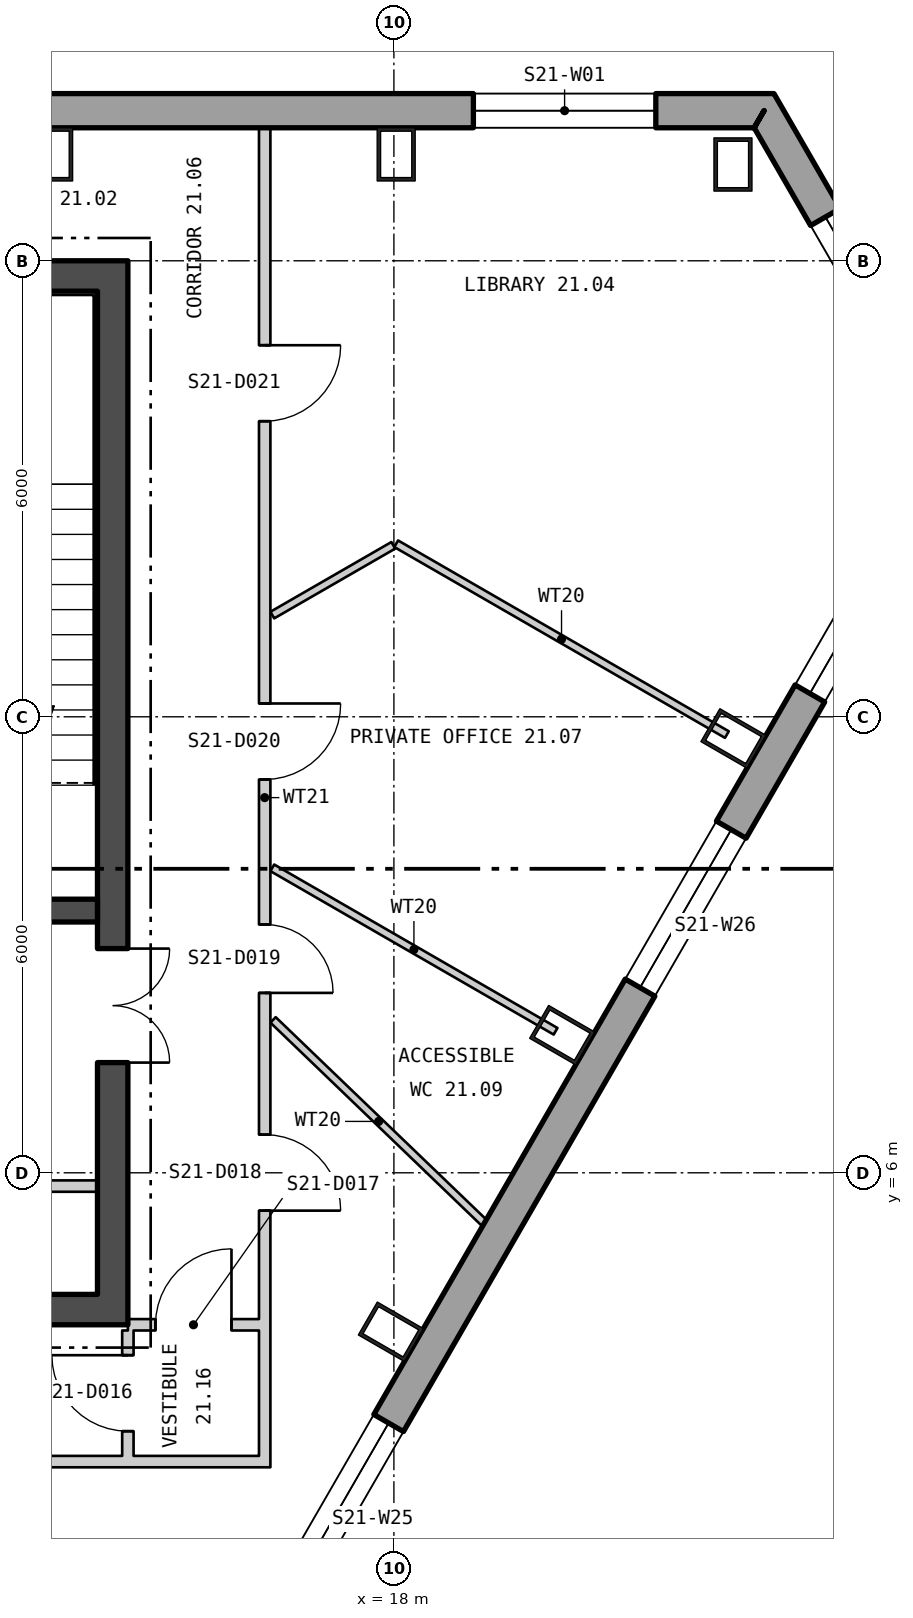
"""IFC4 building model, lengths in metres.
Left out: names, types, materials, properties, quantities, classifications, styles, units other than length and angle.
Written with IfcOpenShell. Run it as: python <this file> out.ifc"""

import sys

from ifc_helpers import new_model, si_unit, direction, frame, frame_2d, origin, origin_2d, place, context, subcontext, project, spatial, polyline, rectangle, hollow_rectangle, outline, extrude, element, fill, save


model = new_model("IFC4")
c1 = context("Model", 3, precision=1e-05, world=origin(), true_north=direction((0.0, 1.0)))
c2 = subcontext(c1, "Body", "Model", "MODEL_VIEW")
j1 = project(units=[si_unit("LENGTHUNIT", "METRE"), si_unit("PLANEANGLEUNIT", "RADIAN")], contexts=[c1])
p1 = place(None, origin())
s1 = spatial("IfcSite", under=j1, at=p1, CompositionType="ELEMENT")
p2 = place(p1, origin())
s2 = spatial("IfcBuilding", under=s1, at=p2, CompositionType="ELEMENT")
p3 = place(p2, frame((0.0, 0.0, 280.5)))
s3 = spatial("IfcBuildingStorey", under=s2, at=p3, CompositionType="ELEMENT", Elevation=280.5)
for number, where, z_axis, x_axis in (
    (1, (22.461, 19.267, 0.0), (0.0, 0.0, 1.0), (-1.0, 0.0, 0.0)),
    (2, (18.03, 19.4, 0.0), (0.0, 0.0, 1.0), (-1.0, 0.0, 0.0)),
    (3, (13.523, 19.4, 0.0), (0.0, 0.0, 1.0), (-1.0, 0.0, 0.0)),
    (4, (17.96, 3.908, 0.0), (0.0, 0.0, 1.0), (0.5, 0.866, 0.0)),
    (5, (20.214, 7.811, 0.0), (0.0, 0.0, 1.0), (0.5, 0.866, 0.0)),
    (6, (22.467, 11.715, 0.0), (0.0, 0.0, 1.0), (0.5, 0.866, 0.0)),
):
    element("IfcColumn", number, at=place(p3, frame(where, z_axis=z_axis, x_axis=x_axis)), inside=s3, PredefinedType="COLUMN", context=c2, shape_type="SweptSolid", body=[
        extrude(hollow_rectangle(XDim=0.5, YDim=0.7, WallThickness=0.045, at=origin_2d()), origin(), (0.0, 0.0, 1.0), 3.9),
    ])
p4 = place(p3, frame((22.87, 19.975, -0.4), z_axis=(0.0, 0.0, 1.0), x_axis=(-1.0, 0.0, 0.0)))
e7 = element("IfcWall", 7, at=p4, inside=s3, PredefinedType="SOLIDWALL", context=c2, shape_type="SweptSolid", body=[
    extrude(outline(polyline([(-0.13, -0.225), (45.87, -0.225), (45.61, 0.225), (0.13, 0.225), (-0.13, -0.225)])), origin(), (0.0, 0.0, 1.0), 3.9),
])
p5 = place(p4, frame((1.424, 0.0, 1.3)))
e8 = element("IfcOpeningElement", 8, at=p5, cuts=e7, PredefinedType="OPENING", context=c2, shape_type="SweptSolid", body=[
    extrude(rectangle(XDim=2.4, YDim=2.0, at=frame_2d((1.2, 1.0))), frame((0.0, 0.235, 0.0), z_axis=(0.0, -1.0, 0.0), x_axis=(1.0, 0.0, 0.0)), (0.0, 0.0, 1.0), 0.47),
])
p6 = place(p4, frame((14.909, 0.0, 1.3)))
e9 = element("IfcOpeningElement", 9, at=p6, cuts=e7, PredefinedType="OPENING", context=c2, shape_type="SweptSolid", body=[
    extrude(rectangle(XDim=2.4, YDim=2.0, at=frame_2d((1.2, 1.0))), frame((0.0, 0.235, 0.0), z_axis=(0.0, -1.0, 0.0), x_axis=(1.0, 0.0, 0.0)), (0.0, 0.0, 1.0), 0.47),
])
p7 = place(p4, frame((19.416, 0.0, 1.3)))
e10 = element("IfcOpeningElement", 10, at=p7, cuts=e7, PredefinedType="OPENING", context=c2, shape_type="SweptSolid", body=[
    extrude(rectangle(XDim=2.4, YDim=2.0, at=frame_2d((1.2, 1.0))), frame((0.0, 0.235, 0.0), z_axis=(0.0, -1.0, 0.0), x_axis=(1.0, 0.0, 0.0)), (0.0, 0.0, 1.0), 0.47),
])
p8 = place(p4, frame((23.924, 0.0, 1.3)))
e11 = element("IfcOpeningElement", 11, at=p8, cuts=e7, PredefinedType="OPENING", context=c2, shape_type="SweptSolid", body=[
    extrude(rectangle(XDim=2.4, YDim=2.0, at=frame_2d((1.2, 1.0))), frame((0.0, 0.235, 0.0), z_axis=(0.0, -1.0, 0.0), x_axis=(1.0, 0.0, 0.0)), (0.0, 0.0, 1.0), 0.47),
])
p9 = place(p4, frame((28.431, 0.0, 1.3)))
e12 = element("IfcOpeningElement", 12, at=p9, cuts=e7, PredefinedType="OPENING", context=c2, shape_type="SweptSolid", body=[
    extrude(rectangle(XDim=2.4, YDim=2.0, at=frame_2d((1.2, 1.0))), frame((0.0, 0.235, 0.0), z_axis=(0.0, -1.0, 0.0), x_axis=(1.0, 0.0, 0.0)), (0.0, 0.0, 1.0), 0.47),
])
p10 = place(p4, frame((32.939, 0.0, 1.3)))
e13 = element("IfcOpeningElement", 13, at=p10, cuts=e7, PredefinedType="OPENING", context=c2, shape_type="SweptSolid", body=[
    extrude(rectangle(XDim=2.4, YDim=2.0, at=frame_2d((1.2, 1.0))), frame((0.0, 0.235, 0.0), z_axis=(0.0, -1.0, 0.0), x_axis=(1.0, 0.0, 0.0)), (0.0, 0.0, 1.0), 0.47),
])
p11 = place(p4, frame((41.916, 0.0, 1.3)))
e14 = element("IfcOpeningElement", 14, at=p11, cuts=e7, PredefinedType="OPENING", context=c2, shape_type="SweptSolid", body=[
    extrude(rectangle(XDim=2.4, YDim=2.0, at=frame_2d((1.2, 1.0))), frame((0.0, 0.235, 0.0), z_axis=(0.0, -1.0, 0.0), x_axis=(1.0, 0.0, 0.0)), (0.0, 0.0, 1.0), 0.47),
])
p12 = place(p3, frame((2.515, -23.993, -0.18), z_axis=(0.0, 0.0, 1.0), x_axis=(0.500000711659, 0.866024992908, 0.0)))
e15 = element("IfcWall", 15, at=p12, inside=s3, PredefinedType="SOLIDWALL", context=c2, shape_type="SweptSolid", body=[
    extrude(outline(polyline([(-0.13, -0.225), (45.87, -0.225), (45.61, 0.225), (0.13, 0.225), (-0.13, -0.225)])), origin(), (0.0, 0.0, 1.0), 3.68),
])
p13 = place(p12, frame((1.424, 0.0, 1.08)))
e16 = element("IfcOpeningElement", 16, at=p13, cuts=e15, PredefinedType="OPENING", context=c2, shape_type="SweptSolid", body=[
    extrude(rectangle(XDim=2.4, YDim=2.0, at=frame_2d((1.2, 1.0))), frame((0.0, 0.235, 0.0), z_axis=(0.0, -1.0, 0.0), x_axis=(1.0, 0.0, 0.0)), (0.0, 0.0, 1.0), 0.47),
])
p14 = place(p12, frame((5.893, 0.0, 1.08)))
e17 = element("IfcOpeningElement", 17, at=p14, cuts=e15, PredefinedType="OPENING", context=c2, shape_type="SweptSolid", body=[
    extrude(rectangle(XDim=2.4, YDim=2.0, at=frame_2d((1.2, 1.0))), frame((0.0, 0.235, 0.0), z_axis=(0.0, -1.0, 0.0), x_axis=(1.0, 0.0, 0.0)), (0.0, 0.0, 1.0), 0.47),
])
p15 = place(p12, frame((10.401, 0.0, 1.08)))
e18 = element("IfcOpeningElement", 18, at=p15, cuts=e15, PredefinedType="OPENING", context=c2, shape_type="SweptSolid", body=[
    extrude(rectangle(XDim=2.4, YDim=2.0, at=frame_2d((1.2, 1.0))), frame((0.0, 0.235, 0.0), z_axis=(0.0, -1.0, 0.0), x_axis=(1.0, 0.0, 0.0)), (0.0, 0.0, 1.0), 0.47),
])
p16 = place(p12, frame((14.909, 0.0, 1.08)))
e19 = element("IfcOpeningElement", 19, at=p16, cuts=e15, PredefinedType="OPENING", context=c2, shape_type="SweptSolid", body=[
    extrude(rectangle(XDim=2.4, YDim=2.0, at=frame_2d((1.2, 1.0))), frame((0.0, 0.235, 0.0), z_axis=(0.0, -1.0, 0.0), x_axis=(1.0, 0.0, 0.0)), (0.0, 0.0, 1.0), 0.47),
])
p17 = place(p12, frame((19.416, 0.0, 1.08)))
e20 = element("IfcOpeningElement", 20, at=p17, cuts=e15, PredefinedType="OPENING", context=c2, shape_type="SweptSolid", body=[
    extrude(rectangle(XDim=2.4, YDim=2.0, at=frame_2d((1.2, 1.0))), frame((0.0, 0.235, 0.0), z_axis=(0.0, -1.0, 0.0), x_axis=(1.0, 0.0, 0.0)), (0.0, 0.0, 1.0), 0.47),
])
p18 = place(p12, frame((28.431, 0.0, 1.08)))
e21 = element("IfcOpeningElement", 21, at=p18, cuts=e15, PredefinedType="OPENING", context=c2, shape_type="SweptSolid", body=[
    extrude(rectangle(XDim=2.4, YDim=2.0, at=frame_2d((1.2, 1.0))), frame((0.0, 0.235, 0.0), z_axis=(0.0, -1.0, 0.0), x_axis=(1.0, 0.0, 0.0)), (0.0, 0.0, 1.0), 0.47),
])
p19 = place(p12, frame((37.447, 0.0, 1.08)))
e22 = element("IfcOpeningElement", 22, at=p19, cuts=e15, PredefinedType="OPENING", context=c2, shape_type="SweptSolid", body=[
    extrude(rectangle(XDim=2.4, YDim=2.0, at=frame_2d((1.2, 1.0))), frame((0.0, 0.235, 0.0), z_axis=(0.0, -1.0, 0.0), x_axis=(1.0, 0.0, 0.0)), (0.0, 0.0, 1.0), 0.47),
])
p20 = place(p12, frame((41.916, 0.0, 1.08)))
e23 = element("IfcOpeningElement", 23, at=p20, cuts=e15, PredefinedType="OPENING", context=c2, shape_type="SweptSolid", body=[
    extrude(rectangle(XDim=2.4, YDim=2.0, at=frame_2d((1.2, 1.0))), frame((0.0, 0.235, 0.0), z_axis=(0.0, -1.0, 0.0), x_axis=(1.0, 0.0, 0.0)), (0.0, 0.0, 1.0), 0.47),
])
p21 = place(p3, frame((25.385, 15.619, -0.4), z_axis=(0.0, 0.0, 1.0), x_axis=(-0.49999836324, 0.866026348766, 0.0)))
e24 = element("IfcWall", 24, at=p21, inside=s3, PredefinedType="SOLIDWALL", context=c2, shape_type="SweptSolid", body=[
    extrude(outline(polyline([(-0.13, -0.225), (5.16, -0.225), (4.9, 0.225), (0.13, 0.225), (-0.13, -0.225)])), origin(), (0.0, 0.0, 1.0), 3.9),
])
p22 = place(p21, frame((1.615, 0.0, 1.3)))
e25 = element("IfcOpeningElement", 25, at=p22, cuts=e24, PredefinedType="OPENING", context=c2, shape_type="SweptSolid", body=[
    extrude(rectangle(XDim=1.8, YDim=2.0, at=frame_2d((0.9, 1.0))), frame((0.0, 0.235, 0.0), z_axis=(0.0, -1.0, 0.0), x_axis=(1.0, 0.0, 0.0)), (0.0, 0.0, 1.0), 0.47),
])
p23 = place(p3, frame((-14.5, 4.2, 0.0), z_axis=(0.0, 0.0, 1.0), x_axis=(1.0, 0.0, 0.0)))
e26 = element("IfcWall", 26, at=p23, inside=s3, PredefinedType="SHEAR", context=c2, shape_type="SweptSolid", body=[
    extrude(rectangle(XDim=29.0, YDim=0.4, at=frame_2d((14.5, 0.0))), origin(), (0.0, 0.0, 1.0), 3.7),
])
p24 = place(p23, frame((9.0, 0.0, 0.0)))
e27 = element("IfcOpeningElement", 27, at=p24, cuts=e26, PredefinedType="OPENING", context=c2, shape_type="SweptSolid", body=[
    extrude(rectangle(XDim=1.8, YDim=2.4, at=frame_2d((0.9, 1.2))), frame((0.0, 0.21, 0.0), z_axis=(0.0, -1.0, 0.0), x_axis=(1.0, 0.0, 0.0)), (0.0, 0.0, 1.0), 0.42),
])
p25 = place(p23, frame((19.0, 0.0, 0.0)))
e28 = element("IfcOpeningElement", 28, at=p25, cuts=e26, PredefinedType="OPENING", context=c2, shape_type="SweptSolid", body=[
    extrude(rectangle(XDim=1.8, YDim=2.4, at=frame_2d((0.9, 1.2))), frame((0.0, 0.21, 0.0), z_axis=(0.0, -1.0, 0.0), x_axis=(1.0, 0.0, 0.0)), (0.0, 0.0, 1.0), 0.42),
])
p26 = place(p3, frame((-14.5, 17.8, 0.0), z_axis=(0.0, 0.0, 1.0), x_axis=(1.0, 0.0, 0.0)))
e29 = element("IfcWall", 29, at=p26, inside=s3, PredefinedType="SHEAR", context=c2, shape_type="SweptSolid", body=[
    extrude(rectangle(XDim=29.0, YDim=0.4, at=frame_2d((14.5, 0.0))), origin(), (0.0, 0.0, 1.0), 3.7),
])
p27 = place(p3, frame((14.3, 4.4, 0.0), z_axis=(0.0, 0.0, 1.0), x_axis=(0.0, 1.0, 0.0)))
e30 = element("IfcWall", 30, at=p27, inside=s3, PredefinedType="SHEAR", context=c2, shape_type="SweptSolid", body=[
    extrude(rectangle(XDim=13.2, YDim=0.4, at=frame_2d((6.6, 0.0))), origin(), (0.0, 0.0, 1.0), 3.7),
])
p28 = place(p27, frame((3.05, 0.0, 0.0)))
e31 = element("IfcOpeningElement", 31, at=p28, cuts=e30, PredefinedType="OPENING", context=c2, shape_type="SweptSolid", body=[
    extrude(rectangle(XDim=1.5, YDim=2.1, at=frame_2d((0.75, 1.05))), frame((0.0, 0.21, 0.0), z_axis=(0.0, -1.0, 0.0), x_axis=(1.0, 0.0, 0.0)), (0.0, 0.0, 1.0), 0.42),
])
p29 = place(p3, frame((11.0, 9.45, 0.0), z_axis=(0.0, 0.0, 1.0), x_axis=(1.0, 0.0, 0.0)))
e32 = element("IfcWall", 32, at=p29, inside=s3, PredefinedType="SHEAR", context=c2, shape_type="SweptSolid", body=[
    extrude(rectangle(XDim=3.1, YDim=0.3, at=frame_2d((1.55, 0.0))), origin(), (0.0, 0.0, 1.0), 3.7),
])
p30 = place(p29, frame((0.95, 0.0, 0.0)))
e33 = element("IfcOpeningElement", 33, at=p30, cuts=e32, PredefinedType="OPENING", context=c2, shape_type="SweptSolid", body=[
    extrude(rectangle(XDim=1.2, YDim=2.1, at=frame_2d((0.6, 1.05))), frame((0.0, 0.16, 0.0), z_axis=(0.0, -1.0, 0.0), x_axis=(1.0, 0.0, 0.0)), (0.0, 0.0, 1.0), 0.32),
])
p31 = place(p3, frame((11.0, 5.825, 0.0), z_axis=(0.0, 0.0, 1.0), x_axis=(1.0, 0.0, 0.0)))
e34 = element("IfcWall", 34, at=p31, inside=s3, PredefinedType="PARTITIONING", context=c2, shape_type="SweptSolid", body=[
    extrude(rectangle(XDim=3.1, YDim=0.15, at=frame_2d((1.55, 0.0))), origin(), (0.0, 0.0, 1.0), 3.7),
])
p32 = place(p3, frame((7.72, 2.2, 0.0), z_axis=(0.0, 0.0, 1.0), x_axis=(1.0, 0.0, 0.0)))
e35 = element("IfcWall", 35, at=p32, inside=s3, PredefinedType="PARTITIONING", context=c2, shape_type="SweptSolid", body=[
    extrude(rectangle(XDim=8.505, YDim=0.15, at=frame_2d((4.253, 0.0))), origin(), (0.0, 0.0, 1.0), 3.7),
])
p33 = place(p3, frame((14.5, 2.275, 0.0), z_axis=(0.0, 0.0, 1.0), x_axis=(0.0, 1.0, 0.0)))
e36 = element("IfcWall", 36, at=p33, inside=s3, PredefinedType="PARTITIONING", context=c2, shape_type="SweptSolid", body=[
    extrude(rectangle(XDim=1.65, YDim=0.15, at=frame_2d((0.825, 0.0))), origin(), (0.0, 0.0, 1.0), 3.7),
])
p34 = place(p33, frame((0.325, 0.0, 0.0)))
e37 = element("IfcOpeningElement", 37, at=p34, cuts=e36, PredefinedType="OPENING", context=c2, shape_type="SweptSolid", body=[
    extrude(rectangle(XDim=1.0, YDim=2.1, at=frame_2d((0.5, 1.05))), frame((0.0, 0.085, 0.0), z_axis=(0.0, -1.0, 0.0), x_axis=(1.0, 0.0, 0.0)), (0.0, 0.0, 1.0), 0.17),
])
p35 = place(p3, frame((14.5, 4.0, 0.0), z_axis=(0.0, 0.0, 1.0), x_axis=(1.0, 0.0, 0.0)))
e38 = element("IfcWall", 38, at=p35, inside=s3, PredefinedType="PARTITIONING", context=c2, shape_type="SweptSolid", body=[
    extrude(rectangle(XDim=1.725, YDim=0.15, at=frame_2d((0.863, 0.0))), origin(), (0.0, 0.0, 1.0), 3.16),
])
p36 = place(p35, frame((0.363, 0.0, 0.0)))
e39 = element("IfcOpeningElement", 39, at=p36, cuts=e38, PredefinedType="OPENING", context=c2, shape_type="SweptSolid", body=[
    extrude(rectangle(XDim=1.0, YDim=2.1, at=frame_2d((0.5, 1.05))), frame((0.0, 0.085, 0.0), z_axis=(0.0, -1.0, 0.0), x_axis=(1.0, 0.0, 0.0)), (0.0, 0.0, 1.0), 0.17),
])
p37 = place(p3, frame((16.3, 2.125, 0.0), z_axis=(0.0, 0.0, 1.0), x_axis=(0.0, 1.0, 0.0)))
e40 = element("IfcWall", 40, at=p37, inside=s3, PredefinedType="PARTITIONING", context=c2, shape_type="SweptSolid", body=[
    extrude(rectangle(XDim=17.623, YDim=0.15, at=frame_2d((8.812, 0.0))), origin(), (0.0, 0.0, 1.0), 3.7),
])
p38 = place(p37, frame((3.377, 0.0, 0.0)))
e41 = element("IfcOpeningElement", 41, at=p38, cuts=e40, PredefinedType="OPENING", context=c2, shape_type="SweptSolid", body=[
    extrude(rectangle(XDim=1.0, YDim=2.1, at=frame_2d((0.5, 1.05))), frame((0.0, 0.085, 0.0), z_axis=(0.0, -1.0, 0.0), x_axis=(1.0, 0.0, 0.0)), (0.0, 0.0, 1.0), 0.17),
])
p39 = place(p37, frame((6.242, 0.0, 0.0)))
e42 = element("IfcOpeningElement", 42, at=p39, cuts=e40, PredefinedType="OPENING", context=c2, shape_type="SweptSolid", body=[
    extrude(rectangle(XDim=0.9, YDim=2.1, at=frame_2d((0.45, 1.05))), frame((0.0, 0.085, 0.0), z_axis=(0.0, -1.0, 0.0), x_axis=(1.0, 0.0, 0.0)), (0.0, 0.0, 1.0), 0.17),
])
p40 = place(p37, frame((9.05, 0.0, 0.0)))
e43 = element("IfcOpeningElement", 43, at=p40, cuts=e40, PredefinedType="OPENING", context=c2, shape_type="SweptSolid", body=[
    extrude(rectangle(XDim=1.0, YDim=2.1, at=frame_2d((0.5, 1.05))), frame((0.0, 0.085, 0.0), z_axis=(0.0, -1.0, 0.0), x_axis=(1.0, 0.0, 0.0)), (0.0, 0.0, 1.0), 0.17),
])
p41 = place(p37, frame((13.764, 0.0, 0.0)))
e44 = element("IfcOpeningElement", 44, at=p41, cuts=e40, PredefinedType="OPENING", context=c2, shape_type="SweptSolid", body=[
    extrude(rectangle(XDim=1.0, YDim=2.1, at=frame_2d((0.5, 1.05))), frame((0.0, 0.085, 0.0), z_axis=(0.0, -1.0, 0.0), x_axis=(1.0, 0.0, 0.0)), (0.0, 0.0, 1.0), 0.17),
])
p42 = place(p3, frame((16.4, 13.338, 0.0), z_axis=(0.0, 0.0, 1.0), x_axis=(0.866294275703, 0.499534010738, 0.0)))
e45 = element("IfcWall", 45, at=p42, inside=s3, PredefinedType="PARTITIONING", context=c2, shape_type="SweptSolid", body=[
    extrude(rectangle(XDim=1.838, YDim=0.1, at=frame_2d((0.919, 0.0))), origin(), (0.0, 0.0, 1.0), 3.7),
])
p43 = place(p3, frame((16.4, 10.013, 0.0), z_axis=(0.0, 0.0, 1.0), x_axis=(0.866104329613, -0.499863271531, 0.0)))
e46 = element("IfcWall", 46, at=p43, inside=s3, PredefinedType="PARTITIONING", context=c2, shape_type="SweptSolid", body=[
    extrude(rectangle(XDim=4.303, YDim=0.1, at=frame_2d((2.152, 0.0))), origin(), (0.0, 0.0, 1.0), 3.7),
])
p44 = place(p3, frame((16.41, 8.012, 0.0), z_axis=(0.0, 0.0, 1.0), x_axis=(0.720972589003, -0.692963581948, 0.0)))
e47 = element("IfcWall", 47, at=p44, inside=s3, PredefinedType="PARTITIONING", context=c2, shape_type="SweptSolid", body=[
    extrude(rectangle(XDim=3.856, YDim=0.1, at=frame_2d((1.928, 0.0))), origin(), (0.0, 0.0, 1.0), 3.7),
])
p45 = place(p3, frame((18.03, 14.277, 0.0), z_axis=(0.0, 0.0, 1.0), x_axis=(0.866115983499, -0.499843078503, 0.0)))
e48 = element("IfcWall", 48, at=p45, inside=s3, PredefinedType="PARTITIONING", context=c2, shape_type="SweptSolid", body=[
    extrude(rectangle(XDim=5.024, YDim=0.1, at=frame_2d((2.512, 0.0))), origin(), (0.0, 0.0, 1.0), 3.7),
])
p46 = place(p5, origin())
e49 = element("IfcWindow", 49, at=p46, inside=s3, PartitioningType="SINGLE_PANEL", PredefinedType="WINDOW", context=c2, shape_type="SweptSolid", body=[
    extrude(rectangle(XDim=2.4, YDim=2.0, at=frame_2d((1.2, 1.0))), frame((0.0, 0.105, 0.0), z_axis=(0.0, -1.0, 0.0), x_axis=(1.0, 0.0, 0.0)), (0.0, 0.0, 1.0), 0.06),
])
fill(e8, e49)
p47 = place(p18, origin())
e50 = element("IfcWindow", 50, at=p47, inside=s3, PartitioningType="SINGLE_PANEL", PredefinedType="WINDOW", context=c2, shape_type="SweptSolid", body=[
    extrude(rectangle(XDim=2.4, YDim=2.0, at=frame_2d((1.2, 1.0))), frame((0.0, 0.105, 0.0), z_axis=(0.0, -1.0, 0.0), x_axis=(1.0, 0.0, 0.0)), (0.0, 0.0, 1.0), 0.06),
])
fill(e21, e50)
p48 = place(p19, origin())
e51 = element("IfcWindow", 51, at=p48, inside=s3, PartitioningType="SINGLE_PANEL", PredefinedType="WINDOW", context=c2, shape_type="SweptSolid", body=[
    extrude(rectangle(XDim=2.4, YDim=2.0, at=frame_2d((1.2, 1.0))), frame((0.0, 0.105, 0.0), z_axis=(0.0, -1.0, 0.0), x_axis=(1.0, 0.0, 0.0)), (0.0, 0.0, 1.0), 0.06),
])
fill(e22, e51)
p49 = place(p20, origin())
e52 = element("IfcWindow", 52, at=p49, inside=s3, PartitioningType="SINGLE_PANEL", PredefinedType="WINDOW", context=c2, shape_type="SweptSolid", body=[
    extrude(rectangle(XDim=2.4, YDim=2.0, at=frame_2d((1.2, 1.0))), frame((0.0, 0.105, 0.0), z_axis=(0.0, -1.0, 0.0), x_axis=(1.0, 0.0, 0.0)), (0.0, 0.0, 1.0), 0.06),
])
fill(e23, e52)
p50 = place(p22, origin())
e53 = element("IfcWindow", 53, at=p50, inside=s3, PartitioningType="SINGLE_PANEL", PredefinedType="WINDOW", context=c2, shape_type="SweptSolid", body=[
    extrude(rectangle(XDim=1.8, YDim=2.0, at=frame_2d((0.9, 1.0))), frame((0.0, 0.105, 0.0), z_axis=(0.0, -1.0, 0.0), x_axis=(1.0, 0.0, 0.0)), (0.0, 0.0, 1.0), 0.06),
])
fill(e25, e53)
p51 = place(p28, origin())
e54 = element("IfcDoor", 54, at=p51, inside=s3, OperationType="DOUBLE_DOOR_SINGLE_SWING", PredefinedType="DOOR", context=c2, shape_type="SweptSolid", body=[
    extrude(rectangle(XDim=1.5, YDim=2.1, at=frame_2d((0.75, 1.05))), frame((0.0, 0.025, 0.0), z_axis=(0.0, -1.0, 0.0), x_axis=(1.0, 0.0, 0.0)), (0.0, 0.0, 1.0), 0.05),
])
fill(e31, e54)
p52 = place(p34, origin())
e55 = element("IfcDoor", 55, at=p52, inside=s3, OperationType="SINGLE_SWING_LEFT", PredefinedType="DOOR", context=c2, shape_type="SweptSolid", body=[
    extrude(rectangle(XDim=1.0, YDim=2.1, at=frame_2d((0.5, 1.05))), frame((0.0, 0.025, 0.0), z_axis=(0.0, -1.0, 0.0), x_axis=(1.0, 0.0, 0.0)), (0.0, 0.0, 1.0), 0.05),
])
fill(e37, e55)
p53 = place(p36, origin())
e56 = element("IfcDoor", 56, at=p53, inside=s3, OperationType="SINGLE_SWING_LEFT", PredefinedType="DOOR", context=c2, shape_type="SweptSolid", body=[
    extrude(rectangle(XDim=1.0, YDim=2.1, at=frame_2d((0.5, 1.05))), frame((0.0, 0.025, 0.0), z_axis=(0.0, -1.0, 0.0), x_axis=(1.0, 0.0, 0.0)), (0.0, 0.0, 1.0), 0.05),
])
fill(e39, e56)
p54 = place(p38, origin())
e57 = element("IfcDoor", 57, at=p54, inside=s3, OperationType="SINGLE_SWING_LEFT", PredefinedType="DOOR", context=c2, shape_type="SweptSolid", body=[
    extrude(rectangle(XDim=1.0, YDim=2.1, at=frame_2d((0.5, 1.05))), frame((0.0, 0.025, 0.0), z_axis=(0.0, -1.0, 0.0), x_axis=(1.0, 0.0, 0.0)), (0.0, 0.0, 1.0), 0.05),
])
fill(e41, e57)
p55 = place(p39, origin())
e58 = element("IfcDoor", 58, at=p55, inside=s3, OperationType="SINGLE_SWING_LEFT", PredefinedType="DOOR", context=c2, shape_type="SweptSolid", body=[
    extrude(rectangle(XDim=0.9, YDim=2.1, at=frame_2d((0.45, 1.05))), frame((0.0, 0.025, 0.0), z_axis=(0.0, -1.0, 0.0), x_axis=(1.0, 0.0, 0.0)), (0.0, 0.0, 1.0), 0.05),
])
fill(e42, e58)
p56 = place(p40, origin())
e59 = element("IfcDoor", 59, at=p56, inside=s3, OperationType="SINGLE_SWING_RIGHT", PredefinedType="DOOR", context=c2, shape_type="SweptSolid", body=[
    extrude(rectangle(XDim=1.0, YDim=2.1, at=frame_2d((0.5, 1.05))), frame((0.0, 0.025, 0.0), z_axis=(0.0, -1.0, 0.0), x_axis=(1.0, 0.0, 0.0)), (0.0, 0.0, 1.0), 0.05),
])
fill(e43, e59)
p57 = place(p41, origin())
e60 = element("IfcDoor", 60, at=p57, inside=s3, OperationType="SINGLE_SWING_RIGHT", PredefinedType="DOOR", context=c2, shape_type="SweptSolid", body=[
    extrude(rectangle(XDim=1.0, YDim=2.1, at=frame_2d((0.5, 1.05))), frame((0.0, 0.025, 0.0), z_axis=(0.0, -1.0, 0.0), x_axis=(1.0, 0.0, 0.0)), (0.0, 0.0, 1.0), 0.05),
])
fill(e44, e60)
save(model, sys.argv[1])
